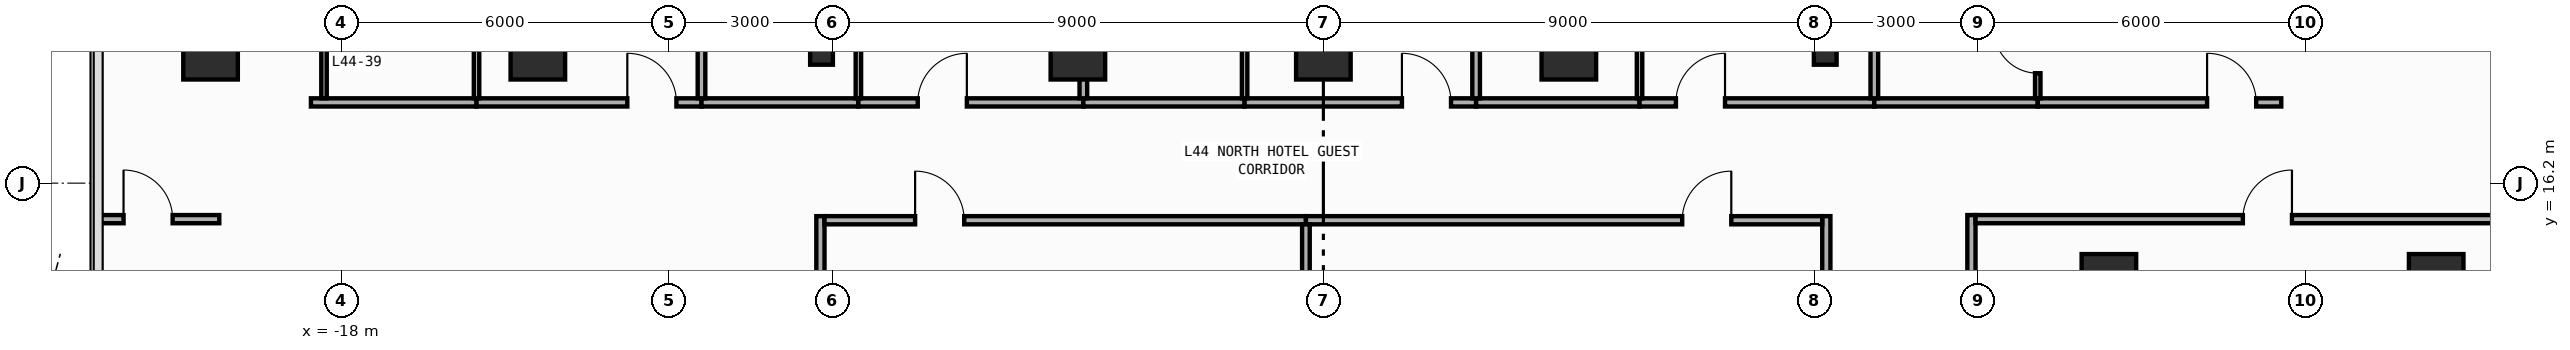
"""IFC4 building model, lengths in metres.
Left out: names, types, materials, properties, quantities, classifications, styles, units other than length and angle.
Written with IfcOpenShell. Run it as: python <this file> out.ifc"""

import sys

from ifc_helpers import new_model, si_unit, direction, frame, frame_2d, origin, origin_2d, place, context, subcontext, project, spatial, rectangle, i_section, extrude, element, fill, save


model = new_model("IFC4")
c1 = context("Model", 3, precision=1e-05, world=origin(), true_north=direction((0.0, 1.0)))
c2 = subcontext(c1, "Body", "Model", "MODEL_VIEW")
j1 = project(units=[si_unit("LENGTHUNIT", "METRE"), si_unit("PLANEANGLEUNIT", "RADIAN")], contexts=[c1])
p1 = place(None, origin())
s1 = spatial("IfcSite", under=j1, at=p1, CompositionType="ELEMENT")
p2 = place(p1, origin())
s2 = spatial("IfcBuilding", under=s1, at=p2, CompositionType="ELEMENT")
p3 = place(p2, frame((0.0, 0.0, 191.6)))
s3 = spatial("IfcBuildingStorey", under=s2, at=p3, CompositionType="ELEMENT", Elevation=191.6)
for number, where, z_axis, x_axis in (
    (1, (-9.2, 18.6, 0.0), (0.0, 0.0, 1.0), (1.0, 0.0, 0.0)),
    (2, (9.2, 18.6, 0.0), (0.0, 0.0, 1.0), (1.0, 0.0, 0.0)),
):
    element("IfcColumn", number, at=place(p3, frame(where, z_axis=z_axis, x_axis=x_axis)), inside=s3, PredefinedType="COLUMN", context=c2, shape_type="SweptSolid", body=[
        extrude(i_section(OverallWidth=0.417, OverallDepth=0.458, WebThickness=0.03, FlangeThickness=0.05, FilletRadius=0.022, at=origin_2d()), origin(), (0.0, 0.0, 1.0), 3.8),
    ])
for number, where, z_axis, x_axis in (
    (3, (-20.4, 18.6, 0.0), (0.0, 0.0, 1.0), (1.0, 0.0, 0.0)),
    (4, (20.4, 14.4, 0.0), (0.0, 0.0, 1.0), (1.0, 0.0, 0.0)),
    (5, (-14.4, 18.6, 0.0), (0.0, 0.0, 1.0), (1.0, 0.0, 0.0)),
    (6, (14.4, 14.4, 0.0), (0.0, 0.0, 1.0), (1.0, 0.0, 0.0)),
    (7, (-4.5, 18.6, 0.0), (0.0, 0.0, 1.0), (1.0, 0.0, 0.0)),
    (8, (0.0, 18.6, 0.0), (0.0, 0.0, 1.0), (1.0, 0.0, 0.0)),
    (9, (4.5, 18.6, 0.0), (0.0, 0.0, 1.0), (1.0, 0.0, 0.0)),
):
    element("IfcColumn", number, at=place(p3, frame(where, z_axis=z_axis, x_axis=x_axis)), inside=s3, PredefinedType="COLUMN", context=c2, shape_type="SweptSolid", body=[
        extrude(rectangle(XDim=1.0, YDim=1.0, at=origin_2d()), origin(), (0.0, 0.0, 1.0), 3.8),
    ])
p4 = place(p3, frame((-9.22, 2.8, 0.0), z_axis=(0.0, 0.0, 1.0), x_axis=(0.0, 1.0, 0.0)))
e10 = element("IfcWall", 10, at=p4, inside=s3, PredefinedType="PARTITIONING", context=c2, shape_type="SweptSolid", body=[
    extrude(rectangle(XDim=12.795, YDim=0.15, at=frame_2d((6.397, 0.0))), origin(), (0.0, 0.0, 1.0), 2.952),
])
p5 = place(p4, frame((2.086, 0.0, 0.0)))
e11 = element("IfcOpeningElement", 11, at=p5, cuts=e10, PredefinedType="OPENING", context=c2, shape_type="SweptSolid", body=[
    extrude(rectangle(XDim=0.9, YDim=2.15, at=frame_2d((0.45, 1.075))), frame((0.0, 0.085, 0.0), z_axis=(0.0, -1.0, 0.0), x_axis=(1.0, 0.0, 0.0)), (0.0, 0.0, 1.0), 0.17),
])
p6 = place(p3, frame((9.22, 2.8, 0.0), z_axis=(0.0, 0.0, 1.0), x_axis=(0.0, 1.0, 0.0)))
e12 = element("IfcWall", 12, at=p6, inside=s3, PredefinedType="PARTITIONING", context=c2, shape_type="SweptSolid", body=[
    extrude(rectangle(XDim=12.795, YDim=0.15, at=frame_2d((6.397, 0.0))), origin(), (0.0, 0.0, 1.0), 2.952),
])
p7 = place(p6, frame((2.086, 0.0, 0.0)))
e13 = element("IfcOpeningElement", 13, at=p7, cuts=e12, PredefinedType="OPENING", context=c2, shape_type="SweptSolid", body=[
    extrude(rectangle(XDim=0.9, YDim=2.15, at=frame_2d((0.45, 1.075))), frame((0.0, 0.085, 0.0), z_axis=(0.0, -1.0, 0.0), x_axis=(1.0, 0.0, 0.0)), (0.0, 0.0, 1.0), 0.17),
])
p8 = place(p3, frame((11.88, 7.16, 0.0), z_axis=(0.0, 0.0, 1.0), x_axis=(0.0, 1.0, 0.0)))
e14 = element("IfcWall", 14, at=p8, inside=s3, PredefinedType="PARTITIONING", context=c2, shape_type="SweptSolid", body=[
    extrude(rectangle(XDim=8.455, YDim=0.15, at=frame_2d((4.228, 0.0))), origin(), (0.0, 0.0, 1.0), 3.54),
])
p9 = place(p8, frame((0.46, 0.0, 0.0)))
e15 = element("IfcOpeningElement", 15, at=p9, cuts=e14, PredefinedType="OPENING", context=c2, shape_type="SweptSolid", body=[
    extrude(rectangle(XDim=0.9, YDim=2.15, at=frame_2d((0.45, 1.075))), frame((0.0, 0.085, 0.0), z_axis=(0.0, -1.0, 0.0), x_axis=(1.0, 0.0, 0.0)), (0.0, 0.0, 1.0), 0.17),
])
p10 = place(p3, frame((-9.145, 15.52, 0.0), z_axis=(0.0, 0.0, 1.0), x_axis=(1.0, 0.0, 0.0)))
e16 = element("IfcWall", 16, at=p10, inside=s3, PredefinedType="PARTITIONING", context=c2, shape_type="SweptSolid", body=[
    extrude(rectangle(XDim=8.825, YDim=0.15, at=frame_2d((4.413, 0.0))), origin(), (0.0, 0.0, 1.0), 3.54),
])
p11 = place(p10, frame((1.661, 0.0, 0.0)))
e17 = element("IfcOpeningElement", 17, at=p11, cuts=e16, PredefinedType="OPENING", context=c2, shape_type="SweptSolid", body=[
    extrude(rectangle(XDim=0.9, YDim=2.15, at=frame_2d((0.45, 1.075))), frame((0.0, 0.085, 0.0), z_axis=(0.0, -1.0, 0.0), x_axis=(1.0, 0.0, 0.0)), (0.0, 0.0, 1.0), 0.17),
])
p12 = place(p3, frame((-0.32, 15.52, 0.0), z_axis=(0.0, 0.0, 1.0), x_axis=(1.0, 0.0, 0.0)))
e18 = element("IfcWall", 18, at=p12, inside=s3, PredefinedType="PARTITIONING", context=c2, shape_type="SweptSolid", body=[
    extrude(rectangle(XDim=9.465, YDim=0.15, at=frame_2d((4.732, 0.0))), origin(), (0.0, 0.0, 1.0), 3.54),
])
p13 = place(p12, frame((6.898, 0.0, 0.0)))
e19 = element("IfcOpeningElement", 19, at=p13, cuts=e18, PredefinedType="OPENING", context=c2, shape_type="SweptSolid", body=[
    extrude(rectangle(XDim=0.9, YDim=2.15, at=frame_2d((0.45, 1.075))), frame((0.0, 0.085, 0.0), z_axis=(0.0, -1.0, 0.0), x_axis=(1.0, 0.0, 0.0)), (0.0, 0.0, 1.0), 0.17),
])
p14 = place(p3, frame((-18.56, 17.68, 0.0), z_axis=(0.0, 0.0, 1.0), x_axis=(1.0, 0.0, 0.0)))
e20 = element("IfcWall", 20, at=p14, inside=s3, PredefinedType="PARTITIONING", context=c2, shape_type="SweptSolid", body=[
    extrude(rectangle(XDim=3.036, YDim=0.15, at=frame_2d((1.518, 0.0))), origin(), (0.0, 0.0, 1.0), 3.54),
])
p15 = place(p3, frame((-15.524, 17.68, 0.0), z_axis=(0.0, 0.0, 1.0), x_axis=(1.0, 0.0, 0.0)))
e21 = element("IfcWall", 21, at=p15, inside=s3, PredefinedType="PARTITIONING", context=c2, shape_type="SweptSolid", body=[
    extrude(rectangle(XDim=4.124, YDim=0.15, at=frame_2d((2.062, 0.0))), origin(), (0.0, 0.0, 1.0), 3.54),
])
p16 = place(p15, frame((2.764, 0.0, 0.0)))
e22 = element("IfcOpeningElement", 22, at=p16, cuts=e21, PredefinedType="OPENING", context=c2, shape_type="SweptSolid", body=[
    extrude(rectangle(XDim=0.9, YDim=2.15, at=frame_2d((0.45, 1.075))), frame((0.0, 0.085, 0.0), z_axis=(0.0, -1.0, 0.0), x_axis=(1.0, 0.0, 0.0)), (0.0, 0.0, 1.0), 0.17),
])
p17 = place(p3, frame((-11.4, 17.68, 0.0), z_axis=(0.0, 0.0, 1.0), x_axis=(1.0, 0.0, 0.0)))
e23 = element("IfcWall", 23, at=p17, inside=s3, PredefinedType="PARTITIONING", context=c2, shape_type="SweptSolid", body=[
    extrude(rectangle(XDim=2.876, YDim=0.15, at=frame_2d((1.438, 0.0))), origin(), (0.0, 0.0, 1.0), 3.54),
])
p18 = place(p3, frame((-8.524, 17.68, 0.0), z_axis=(0.0, 0.0, 1.0), x_axis=(1.0, 0.0, 0.0)))
e24 = element("IfcWall", 24, at=p18, inside=s3, PredefinedType="PARTITIONING", context=c2, shape_type="SweptSolid", body=[
    extrude(rectangle(XDim=4.124, YDim=0.15, at=frame_2d((2.062, 0.0))), origin(), (0.0, 0.0, 1.0), 3.54),
])
p19 = place(p18, frame((1.088, 0.0, 0.0)))
e25 = element("IfcOpeningElement", 25, at=p19, cuts=e24, PredefinedType="OPENING", context=c2, shape_type="SweptSolid", body=[
    extrude(rectangle(XDim=0.9, YDim=2.15, at=frame_2d((0.45, 1.075))), frame((0.0, 0.085, 0.0), z_axis=(0.0, -1.0, 0.0), x_axis=(1.0, 0.0, 0.0)), (0.0, 0.0, 1.0), 0.17),
])
p20 = place(p3, frame((-4.4, 17.68, 0.0), z_axis=(0.0, 0.0, 1.0), x_axis=(1.0, 0.0, 0.0)))
e26 = element("IfcWall", 26, at=p20, inside=s3, PredefinedType="PARTITIONING", context=c2, shape_type="SweptSolid", body=[
    extrude(rectangle(XDim=2.956, YDim=0.15, at=frame_2d((1.478, 0.0))), origin(), (0.0, 0.0, 1.0), 3.54),
])
p21 = place(p3, frame((-1.444, 17.68, 0.0), z_axis=(0.0, 0.0, 1.0), x_axis=(1.0, 0.0, 0.0)))
e27 = element("IfcWall", 27, at=p21, inside=s3, PredefinedType="PARTITIONING", context=c2, shape_type="SweptSolid", body=[
    extrude(rectangle(XDim=4.244, YDim=0.15, at=frame_2d((2.122, 0.0))), origin(), (0.0, 0.0, 1.0), 3.54),
])
p22 = place(p21, frame((2.884, 0.0, 0.0)))
e28 = element("IfcOpeningElement", 28, at=p22, cuts=e27, PredefinedType="OPENING", context=c2, shape_type="SweptSolid", body=[
    extrude(rectangle(XDim=0.9, YDim=2.15, at=frame_2d((0.45, 1.075))), frame((0.0, 0.085, 0.0), z_axis=(0.0, -1.0, 0.0), x_axis=(1.0, 0.0, 0.0)), (0.0, 0.0, 1.0), 0.17),
])
p23 = place(p3, frame((2.8, 17.68, 0.0), z_axis=(0.0, 0.0, 1.0), x_axis=(1.0, 0.0, 0.0)))
e29 = element("IfcWall", 29, at=p23, inside=s3, PredefinedType="PARTITIONING", context=c2, shape_type="SweptSolid", body=[
    extrude(rectangle(XDim=2.996, YDim=0.15, at=frame_2d((1.498, 0.0))), origin(), (0.0, 0.0, 1.0), 3.54),
])
p24 = place(p3, frame((5.796, 17.68, 0.0), z_axis=(0.0, 0.0, 1.0), x_axis=(1.0, 0.0, 0.0)))
e30 = element("IfcWall", 30, at=p24, inside=s3, PredefinedType="PARTITIONING", context=c2, shape_type="SweptSolid", body=[
    extrude(rectangle(XDim=4.304, YDim=0.15, at=frame_2d((2.152, 0.0))), origin(), (0.0, 0.0, 1.0), 3.54),
])
p25 = place(p24, frame((0.667, 0.0, 0.0)))
e31 = element("IfcOpeningElement", 31, at=p25, cuts=e30, PredefinedType="OPENING", context=c2, shape_type="SweptSolid", body=[
    extrude(rectangle(XDim=0.9, YDim=2.15, at=frame_2d((0.45, 1.075))), frame((0.0, 0.085, 0.0), z_axis=(0.0, -1.0, 0.0), x_axis=(1.0, 0.0, 0.0)), (0.0, 0.0, 1.0), 0.17),
])
p26 = place(p3, frame((10.1, 17.68, 0.0), z_axis=(0.0, 0.0, 1.0), x_axis=(1.0, 0.0, 0.0)))
e32 = element("IfcWall", 32, at=p26, inside=s3, PredefinedType="PARTITIONING", context=c2, shape_type="SweptSolid", body=[
    extrude(rectangle(XDim=2.996, YDim=0.15, at=frame_2d((1.498, 0.0))), origin(), (0.0, 0.0, 1.0), 3.54),
])
p27 = place(p3, frame((13.096, 17.68, 0.0), z_axis=(0.0, 0.0, 1.0), x_axis=(1.0, 0.0, 0.0)))
e33 = element("IfcWall", 33, at=p27, inside=s3, PredefinedType="PARTITIONING", context=c2, shape_type="SweptSolid", body=[
    extrude(rectangle(XDim=4.464, YDim=0.15, at=frame_2d((2.232, 0.0))), origin(), (0.0, 0.0, 1.0), 3.54),
])
p28 = place(p27, frame((3.104, 0.0, 0.0)))
e34 = element("IfcOpeningElement", 34, at=p28, cuts=e33, PredefinedType="OPENING", context=c2, shape_type="SweptSolid", body=[
    extrude(rectangle(XDim=0.9, YDim=2.15, at=frame_2d((0.45, 1.075))), frame((0.0, 0.085, 0.0), z_axis=(0.0, -1.0, 0.0), x_axis=(1.0, 0.0, 0.0)), (0.0, 0.0, 1.0), 0.17),
])
p29 = place(p3, frame((11.955, 15.54, 0.0), z_axis=(0.0, 0.0, 1.0), x_axis=(1.0, 0.0, 0.0)))
e35 = element("IfcWall", 35, at=p29, inside=s3, PredefinedType="PARTITIONING", context=c2, shape_type="SweptSolid", body=[
    extrude(rectangle(XDim=10.5, YDim=0.15, at=frame_2d((5.25, 0.0))), origin(), (0.0, 0.0, 1.0), 3.54),
])
p30 = place(p29, frame((4.901, 0.0, 0.0)))
e36 = element("IfcOpeningElement", 36, at=p30, cuts=e35, PredefinedType="OPENING", context=c2, shape_type="SweptSolid", body=[
    extrude(rectangle(XDim=0.9, YDim=2.15, at=frame_2d((0.45, 1.075))), frame((0.0, 0.085, 0.0), z_axis=(0.0, -1.0, 0.0), x_axis=(1.0, 0.0, 0.0)), (0.0, 0.0, 1.0), 0.17),
])
p31 = place(p3, frame((-22.455, 15.54, 0.0), z_axis=(0.0, 0.0, 1.0), x_axis=(1.0, 0.0, 0.0)))
e37 = element("IfcWall", 37, at=p31, inside=s3, PredefinedType="PARTITIONING", context=c2, shape_type="SweptSolid", body=[
    extrude(rectangle(XDim=2.215, YDim=0.15, at=frame_2d((1.107, 0.0))), origin(), (0.0, 0.0, 1.0), 3.54),
])
p32 = place(p31, frame((0.46, 0.0, 0.0)))
e38 = element("IfcOpeningElement", 38, at=p32, cuts=e37, PredefinedType="OPENING", context=c2, shape_type="SweptSolid", body=[
    extrude(rectangle(XDim=0.9, YDim=2.15, at=frame_2d((0.45, 1.075))), frame((0.0, 0.085, 0.0), z_axis=(0.0, -1.0, 0.0), x_axis=(1.0, 0.0, 0.0)), (0.0, 0.0, 1.0), 0.17),
])
p33 = place(p3, frame((-0.32, 2.87, 0.0), z_axis=(0.0, 0.0, 1.0), x_axis=(0.0, 1.0, 0.0)))
e39 = element("IfcWall", 39, at=p33, inside=s3, PredefinedType="PARTITIONING", context=c2, shape_type="SweptSolid", body=[
    extrude(rectangle(XDim=12.575, YDim=0.14, at=frame_2d((6.288, 0.0))), origin(), (0.0, 0.0, 1.0), 3.54),
])
p34 = place(p3, frame((-15.524, 17.755, 0.0), z_axis=(0.0, 0.0, 1.0), x_axis=(0.0, 1.0, 0.0)))
e40 = element("IfcWall", 40, at=p34, inside=s3, PredefinedType="PARTITIONING", context=c2, shape_type="SweptSolid", body=[
    extrude(rectangle(XDim=2.965, YDim=0.1, at=frame_2d((1.482, 0.0))), origin(), (0.0, 0.0, 1.0), 3.54),
])
p35 = place(p34, frame((1.705, 0.0, 0.0)))
e41 = element("IfcOpeningElement", 41, at=p35, cuts=e40, PredefinedType="OPENING", context=c2, shape_type="SweptSolid", body=[
    extrude(rectangle(XDim=0.8, YDim=2.1, at=frame_2d((0.4, 1.05))), frame((0.0, 0.06, 0.0), z_axis=(0.0, -1.0, 0.0), x_axis=(1.0, 0.0, 0.0)), (0.0, 0.0, 1.0), 0.12),
])
p36 = place(p3, frame((-11.4, 17.755, 0.0), z_axis=(0.0, 0.0, 1.0), x_axis=(0.0, 1.0, 0.0)))
e42 = element("IfcWall", 42, at=p36, inside=s3, PredefinedType="PARTITIONING", context=c2, shape_type="SweptSolid", body=[
    extrude(rectangle(XDim=3.015, YDim=0.14, at=frame_2d((1.508, 0.0))), origin(), (0.0, 0.0, 1.0), 3.54),
])
p37 = place(p3, frame((-8.524, 17.755, 0.0), z_axis=(0.0, 0.0, 1.0), x_axis=(0.0, 1.0, 0.0)))
e43 = element("IfcWall", 43, at=p37, inside=s3, PredefinedType="PARTITIONING", context=c2, shape_type="SweptSolid", body=[
    extrude(rectangle(XDim=2.965, YDim=0.1, at=frame_2d((1.482, 0.0))), origin(), (0.0, 0.0, 1.0), 3.54),
])
p38 = place(p37, frame((1.705, 0.0, 0.0)))
e44 = element("IfcOpeningElement", 44, at=p38, cuts=e43, PredefinedType="OPENING", context=c2, shape_type="SweptSolid", body=[
    extrude(rectangle(XDim=0.8, YDim=2.1, at=frame_2d((0.4, 1.05))), frame((0.0, 0.06, 0.0), z_axis=(0.0, -1.0, 0.0), x_axis=(1.0, 0.0, 0.0)), (0.0, 0.0, 1.0), 0.12),
])
p39 = place(p3, frame((-4.4, 17.755, 0.0), z_axis=(0.0, 0.0, 1.0), x_axis=(0.0, 1.0, 0.0)))
e45 = element("IfcWall", 45, at=p39, inside=s3, PredefinedType="PARTITIONING", context=c2, shape_type="SweptSolid", body=[
    extrude(rectangle(XDim=3.015, YDim=0.14, at=frame_2d((1.508, 0.0))), origin(), (0.0, 0.0, 1.0), 3.54),
])
p40 = place(p3, frame((-1.444, 17.755, 0.0), z_axis=(0.0, 0.0, 1.0), x_axis=(0.0, 1.0, 0.0)))
e46 = element("IfcWall", 46, at=p40, inside=s3, PredefinedType="PARTITIONING", context=c2, shape_type="SweptSolid", body=[
    extrude(rectangle(XDim=2.965, YDim=0.1, at=frame_2d((1.482, 0.0))), origin(), (0.0, 0.0, 1.0), 3.54),
])
p41 = place(p40, frame((1.705, 0.0, 0.0)))
e47 = element("IfcOpeningElement", 47, at=p41, cuts=e46, PredefinedType="OPENING", context=c2, shape_type="SweptSolid", body=[
    extrude(rectangle(XDim=0.8, YDim=2.1, at=frame_2d((0.4, 1.05))), frame((0.0, 0.06, 0.0), z_axis=(0.0, -1.0, 0.0), x_axis=(1.0, 0.0, 0.0)), (0.0, 0.0, 1.0), 0.12),
])
p42 = place(p3, frame((2.8, 17.755, 0.0), z_axis=(0.0, 0.0, 1.0), x_axis=(0.0, 1.0, 0.0)))
e48 = element("IfcWall", 48, at=p42, inside=s3, PredefinedType="PARTITIONING", context=c2, shape_type="SweptSolid", body=[
    extrude(rectangle(XDim=3.015, YDim=0.14, at=frame_2d((1.508, 0.0))), origin(), (0.0, 0.0, 1.0), 3.54),
])
p43 = place(p3, frame((5.796, 17.755, 0.0), z_axis=(0.0, 0.0, 1.0), x_axis=(0.0, 1.0, 0.0)))
e49 = element("IfcWall", 49, at=p43, inside=s3, PredefinedType="PARTITIONING", context=c2, shape_type="SweptSolid", body=[
    extrude(rectangle(XDim=2.965, YDim=0.1, at=frame_2d((1.482, 0.0))), origin(), (0.0, 0.0, 1.0), 3.54),
])
p44 = place(p43, frame((1.705, 0.0, 0.0)))
e50 = element("IfcOpeningElement", 50, at=p44, cuts=e49, PredefinedType="OPENING", context=c2, shape_type="SweptSolid", body=[
    extrude(rectangle(XDim=0.8, YDim=2.1, at=frame_2d((0.4, 1.05))), frame((0.0, 0.06, 0.0), z_axis=(0.0, -1.0, 0.0), x_axis=(1.0, 0.0, 0.0)), (0.0, 0.0, 1.0), 0.12),
])
p45 = place(p3, frame((10.1, 17.755, 0.0), z_axis=(0.0, 0.0, 1.0), x_axis=(0.0, 1.0, 0.0)))
e51 = element("IfcWall", 51, at=p45, inside=s3, PredefinedType="PARTITIONING", context=c2, shape_type="SweptSolid", body=[
    extrude(rectangle(XDim=3.015, YDim=0.14, at=frame_2d((1.508, 0.0))), origin(), (0.0, 0.0, 1.0), 3.54),
])
p46 = place(p3, frame((13.096, 17.755, 0.0), z_axis=(0.0, 0.0, 1.0), x_axis=(0.0, 1.0, 0.0)))
e52 = element("IfcWall", 52, at=p46, inside=s3, PredefinedType="PARTITIONING", context=c2, shape_type="SweptSolid", body=[
    extrude(rectangle(XDim=2.965, YDim=0.1, at=frame_2d((1.482, 0.0))), origin(), (0.0, 0.0, 1.0), 3.54),
])
p47 = place(p46, frame((0.46, 0.0, 0.0)))
e53 = element("IfcOpeningElement", 53, at=p47, cuts=e52, PredefinedType="OPENING", context=c2, shape_type="SweptSolid", body=[
    extrude(rectangle(XDim=0.8, YDim=2.1, at=frame_2d((0.4, 1.05))), frame((0.0, 0.06, 0.0), z_axis=(0.0, -1.0, 0.0), x_axis=(1.0, 0.0, 0.0)), (0.0, 0.0, 1.0), 0.12),
])
p48 = place(p3, frame((-18.32, 17.755, 0.0), z_axis=(0.0, 0.0, 1.0), x_axis=(0.0, 1.0, 0.0)))
e54 = element("IfcWall", 54, at=p48, inside=s3, PredefinedType="PARTITIONING", context=c2, shape_type="SweptSolid", body=[
    extrude(rectangle(XDim=2.965, YDim=0.1, at=frame_2d((1.482, 0.0))), origin(), (0.0, 0.0, 1.0), 3.54),
])
p49 = place(p11, origin())
e55 = element("IfcDoor", 55, at=p49, inside=s3, OperationType="SINGLE_SWING_LEFT", PredefinedType="DOOR", context=c2, shape_type="SweptSolid", body=[
    extrude(rectangle(XDim=0.9, YDim=2.15, at=frame_2d((0.45, 1.075))), frame((0.0, 0.025, 0.0), z_axis=(0.0, -1.0, 0.0), x_axis=(1.0, 0.0, 0.0)), (0.0, 0.0, 1.0), 0.05),
])
fill(e17, e55)
p50 = place(p13, origin())
e56 = element("IfcDoor", 56, at=p50, inside=s3, OperationType="SINGLE_SWING_RIGHT", PredefinedType="DOOR", context=c2, shape_type="SweptSolid", body=[
    extrude(rectangle(XDim=0.9, YDim=2.15, at=frame_2d((0.45, 1.075))), frame((0.0, 0.025, 0.0), z_axis=(0.0, -1.0, 0.0), x_axis=(1.0, 0.0, 0.0)), (0.0, 0.0, 1.0), 0.05),
])
fill(e19, e56)
p51 = place(p16, origin())
e57 = element("IfcDoor", 57, at=p51, inside=s3, OperationType="SINGLE_SWING_LEFT", PredefinedType="DOOR", context=c2, shape_type="SweptSolid", body=[
    extrude(rectangle(XDim=0.9, YDim=2.15, at=frame_2d((0.45, 1.075))), frame((0.0, 0.025, 0.0), z_axis=(0.0, -1.0, 0.0), x_axis=(1.0, 0.0, 0.0)), (0.0, 0.0, 1.0), 0.05),
])
fill(e22, e57)
p52 = place(p19, origin())
e58 = element("IfcDoor", 58, at=p52, inside=s3, OperationType="SINGLE_SWING_RIGHT", PredefinedType="DOOR", context=c2, shape_type="SweptSolid", body=[
    extrude(rectangle(XDim=0.9, YDim=2.15, at=frame_2d((0.45, 1.075))), frame((0.0, 0.025, 0.0), z_axis=(0.0, -1.0, 0.0), x_axis=(1.0, 0.0, 0.0)), (0.0, 0.0, 1.0), 0.05),
])
fill(e25, e58)
p53 = place(p22, origin())
e59 = element("IfcDoor", 59, at=p53, inside=s3, OperationType="SINGLE_SWING_LEFT", PredefinedType="DOOR", context=c2, shape_type="SweptSolid", body=[
    extrude(rectangle(XDim=0.9, YDim=2.15, at=frame_2d((0.45, 1.075))), frame((0.0, 0.025, 0.0), z_axis=(0.0, -1.0, 0.0), x_axis=(1.0, 0.0, 0.0)), (0.0, 0.0, 1.0), 0.05),
])
fill(e28, e59)
p54 = place(p25, origin())
e60 = element("IfcDoor", 60, at=p54, inside=s3, OperationType="SINGLE_SWING_RIGHT", PredefinedType="DOOR", context=c2, shape_type="SweptSolid", body=[
    extrude(rectangle(XDim=0.9, YDim=2.15, at=frame_2d((0.45, 1.075))), frame((0.0, 0.025, 0.0), z_axis=(0.0, -1.0, 0.0), x_axis=(1.0, 0.0, 0.0)), (0.0, 0.0, 1.0), 0.05),
])
fill(e31, e60)
p55 = place(p28, origin())
e61 = element("IfcDoor", 61, at=p55, inside=s3, OperationType="SINGLE_SWING_LEFT", PredefinedType="DOOR", context=c2, shape_type="SweptSolid", body=[
    extrude(rectangle(XDim=0.9, YDim=2.15, at=frame_2d((0.45, 1.075))), frame((0.0, 0.025, 0.0), z_axis=(0.0, -1.0, 0.0), x_axis=(1.0, 0.0, 0.0)), (0.0, 0.0, 1.0), 0.05),
])
fill(e34, e61)
p56 = place(p30, origin())
e62 = element("IfcDoor", 62, at=p56, inside=s3, OperationType="SINGLE_SWING_RIGHT", PredefinedType="DOOR", context=c2, shape_type="SweptSolid", body=[
    extrude(rectangle(XDim=0.9, YDim=2.15, at=frame_2d((0.45, 1.075))), frame((0.0, 0.025, 0.0), z_axis=(0.0, -1.0, 0.0), x_axis=(1.0, 0.0, 0.0)), (0.0, 0.0, 1.0), 0.05),
])
fill(e36, e62)
p57 = place(p32, origin())
e63 = element("IfcDoor", 63, at=p57, inside=s3, OperationType="SINGLE_SWING_LEFT", PredefinedType="DOOR", context=c2, shape_type="SweptSolid", body=[
    extrude(rectangle(XDim=0.9, YDim=2.15, at=frame_2d((0.45, 1.075))), frame((0.0, 0.025, 0.0), z_axis=(0.0, -1.0, 0.0), x_axis=(1.0, 0.0, 0.0)), (0.0, 0.0, 1.0), 0.05),
])
fill(e38, e63)
p58 = place(p47, origin())
e64 = element("IfcDoor", 64, at=p58, inside=s3, OperationType="SINGLE_SWING_RIGHT", PredefinedType="DOOR", context=c2, shape_type="SweptSolid", body=[
    extrude(rectangle(XDim=0.8, YDim=2.1, at=frame_2d((0.4, 1.05))), frame((0.0, 0.025, 0.0), z_axis=(0.0, -1.0, 0.0), x_axis=(1.0, 0.0, 0.0)), (0.0, 0.0, 1.0), 0.05),
])
fill(e53, e64)
save(model, sys.argv[1])
